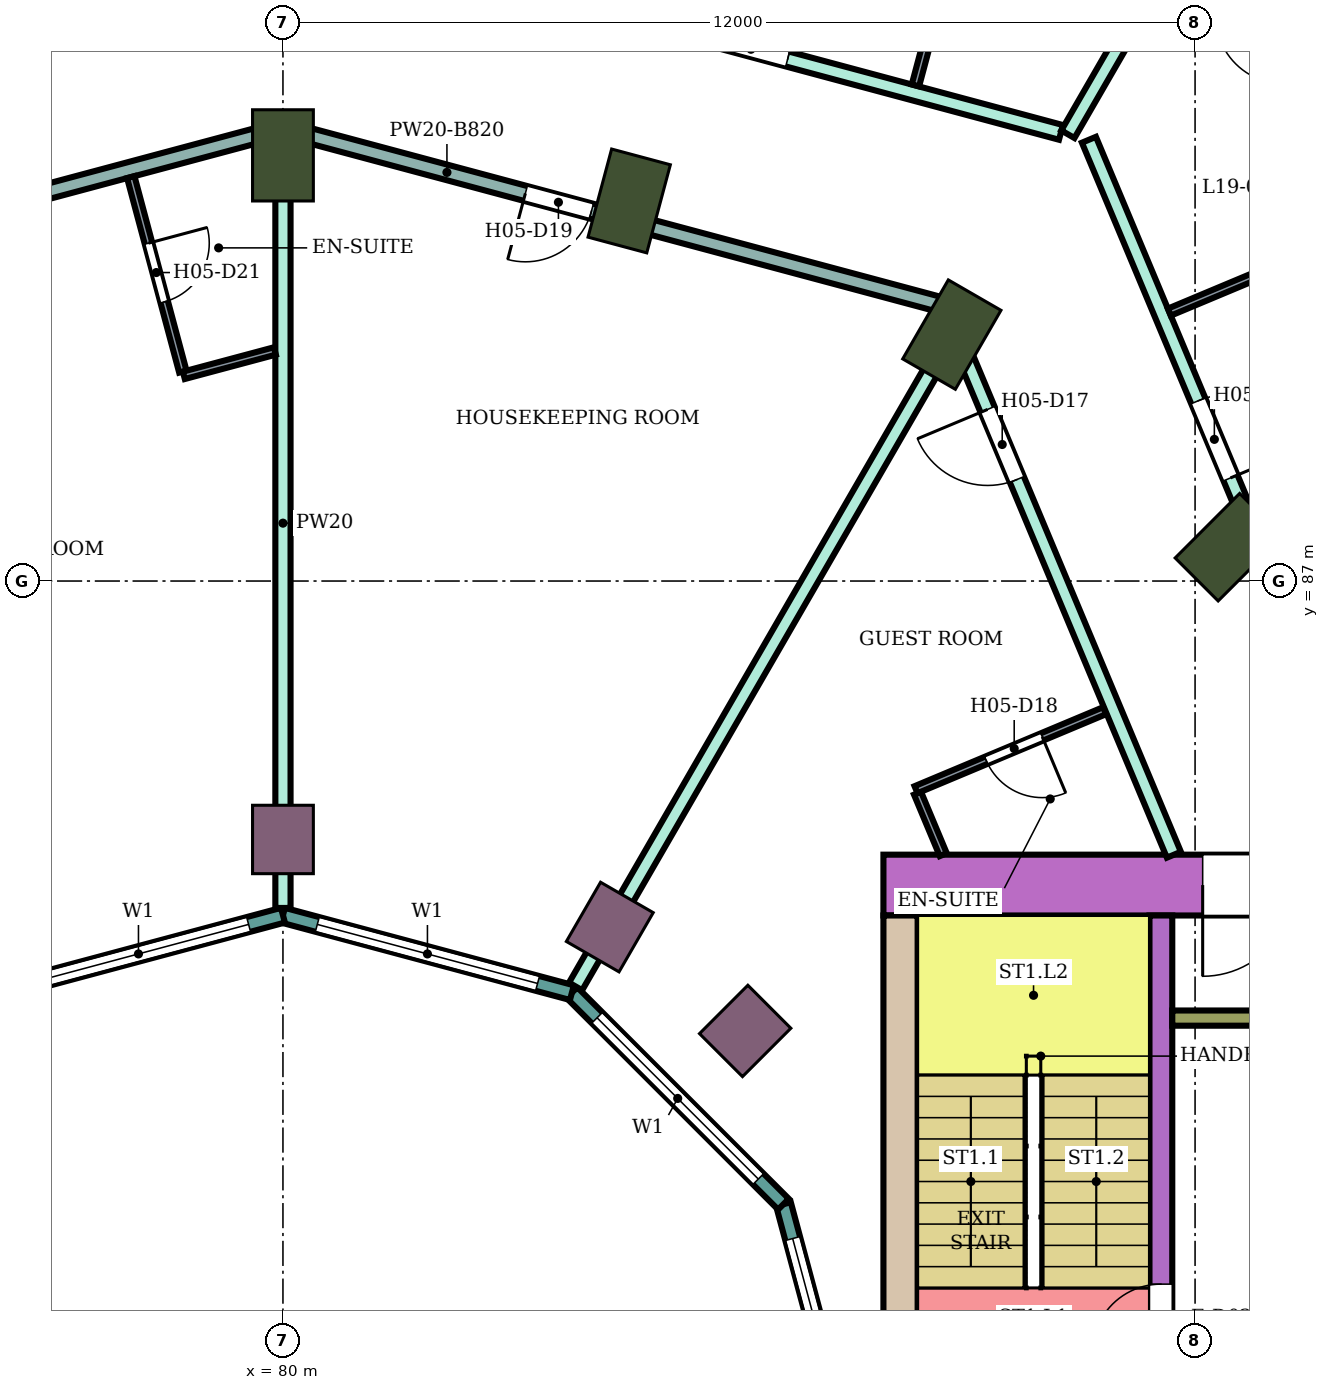
"""IFC4 building model, lengths in metres.
Left out: names, types, materials, properties, quantities, classifications, styles, units other than length and angle.
Written with IfcOpenShell. Run it as: python <this file> out.ifc"""

import sys

from ifc_helpers import new_model, si_unit, direction, frame, frame_2d, origin, origin_2d, place, context, subcontext, project, spatial, rectangle, extrude, element, fill, save


model = new_model("IFC4")
c1 = context("Model", 3, precision=1e-05, world=origin(), true_north=direction((0.0, 1.0)))
c2 = subcontext(c1, "Body", "Model", "MODEL_VIEW")
j1 = project(units=[si_unit("LENGTHUNIT", "METRE"), si_unit("PLANEANGLEUNIT", "RADIAN")], contexts=[c1])
p1 = place(None, origin())
s1 = spatial("IfcSite", under=j1, at=p1, CompositionType="ELEMENT")
p2 = place(p1, origin())
s2 = spatial("IfcBuilding", under=s1, at=p2, CompositionType="ELEMENT")
p3 = place(p2, frame((0.0, 0.0, 86.2)))
s3 = spatial("IfcBuildingStorey", under=s2, at=p3, CompositionType="ELEMENT", Elevation=86.2)
for number, where, z_axis, x_axis in (
    (1, (92.445, 87.445, 0.0), (0.0, 0.0, 1.0), (0.707, 0.707, 0.0)),
    (2, (88.8, 90.242, 0.0), (0.0, 0.0, 1.0), (0.5, 0.866, 0.0)),
    (3, (84.555, 92.0, 0.0), (0.0, 0.0, 1.0), (0.259, 0.966, 0.0)),
    (4, (80.0, 92.6, 0.0), (0.0, 0.0, 1.0), (0.0, 1.0, 0.0)),
):
    element("IfcColumn", number, at=place(p3, frame(where, z_axis=z_axis, x_axis=x_axis)), inside=s3, PredefinedType="COLUMN", context=c2, shape_type="SweptSolid", body=[
        extrude(rectangle(XDim=1.2, YDim=0.8, at=origin_2d()), origin(), (0.0, 0.0, 1.0), 3.8),
    ])
for number, where, z_axis, x_axis in (
    (5, (86.081, 81.081, 0.0), (0.0, 0.0, 1.0), (0.707, 0.707, 0.0)),
    (6, (84.3, 82.448, 0.0), (0.0, 0.0, 1.0), (0.5, 0.866, 0.0)),
    (7, (80.0, 83.6, 0.0), (0.0, 0.0, 1.0), (0.0, 1.0, 0.0)),
):
    element("IfcColumn", number, at=place(p3, frame(where, z_axis=z_axis, x_axis=x_axis)), inside=s3, PredefinedType="COLUMN", context=c2, shape_type="SweptSolid", body=[
        extrude(rectangle(XDim=0.9, YDim=0.8, at=origin_2d()), origin(), (0.0, 0.0, 1.0), 3.8),
    ])
p4 = place(p3, frame((87.9, 83.0, 0.0), z_axis=(0.0, 0.0, 1.0), x_axis=(1.0, 0.0, 0.0)))
e8 = element("IfcWall", 8, at=p4, inside=s3, PredefinedType="SHEAR", context=c2, shape_type="SweptSolid", body=[
    extrude(rectangle(XDim=14.7, YDim=0.8, at=frame_2d((7.35, 0.0))), origin(), (0.0, 0.0, 1.0), 3.48),
])
p5 = place(p4, frame((4.2, 0.0, 0.0)))
e9 = element("IfcOpeningElement", 9, at=p5, cuts=e8, PredefinedType="OPENING", context=c2, shape_type="SweptSolid", body=[
    extrude(rectangle(XDim=2.4, YDim=2.4, at=frame_2d((1.2, 1.2))), frame((0.0, 0.41, 0.0), z_axis=(0.0, -1.0, 0.0), x_axis=(1.0, 0.0, 0.0)), (0.0, 0.0, 1.0), 0.82),
])
p6 = place(p3, frame((88.125, 75.0, 0.0), z_axis=(0.0, 0.0, 1.0), x_axis=(0.0, 1.0, 0.0)))
e10 = element("IfcWall", 10, at=p6, inside=s3, PredefinedType="SHEAR", context=c2, shape_type="SweptSolid", body=[
    extrude(rectangle(XDim=7.6, YDim=0.45, at=frame_2d((3.8, 0.0))), origin(), (0.0, 0.0, 1.0), 3.48),
])
p7 = place(p3, frame((91.55, 75.0, 0.0), z_axis=(0.0, 0.0, 1.0), x_axis=(0.0, 1.0, 0.0)))
e11 = element("IfcWall", 11, at=p7, inside=s3, PredefinedType="SHEAR", context=c2, shape_type="SweptSolid", body=[
    extrude(rectangle(XDim=7.6, YDim=0.3, at=frame_2d((3.8, 0.0))), origin(), (0.0, 0.0, 1.0), 3.48),
])
p8 = place(p7, frame((1.85, 0.0, 0.0)))
e12 = element("IfcOpeningElement", 12, at=p8, cuts=e11, PredefinedType="OPENING", context=c2, shape_type="SweptSolid", body=[
    extrude(rectangle(XDim=0.9, YDim=2.1, at=frame_2d((0.45, 1.05))), frame((0.0, 0.16, 0.0), z_axis=(0.0, -1.0, 0.0), x_axis=(1.0, 0.0, 0.0)), (0.0, 0.0, 1.0), 0.32),
])
p9 = place(p3, frame((91.7, 81.25, 0.0), z_axis=(0.0, 0.0, 1.0), x_axis=(1.0, 0.0, 0.0)))
e13 = element("IfcWall", 13, at=p9, inside=s3, PredefinedType="SHEAR", context=c2, shape_type="SweptSolid", body=[
    extrude(rectangle(XDim=4.65, YDim=0.2, at=frame_2d((2.325, 0.0))), origin(), (0.0, 0.0, 1.0), 3.48),
])
p10 = place(p3, frame((87.604, 75.0, 0.0), z_axis=(0.0, 0.0, 1.0), x_axis=(-0.258789828301, 0.965933654434, 0.0)))
e14 = element("IfcWall", 14, at=p10, inside=s3, PredefinedType="NOTDEFINED", context=c2, shape_type="SweptSolid", body=[
    extrude(rectangle(XDim=3.936, YDim=0.2, at=frame_2d((1.968, 0.0))), origin(), (0.0, 0.0, 1.0), 3.8),
])
p11 = place(p10, frame((0.468, 0.0, 0.9)))
e15 = element("IfcOpeningElement", 15, at=p11, cuts=e14, PredefinedType="OPENING", context=c2, shape_type="SweptSolid", body=[
    extrude(rectangle(XDim=3.0, YDim=2.3, at=frame_2d((1.5, 1.15))), frame((0.0, 0.11, 0.0), z_axis=(0.0, -1.0, 0.0), x_axis=(1.0, 0.0, 0.0)), (0.0, 0.0, 1.0), 0.22),
])
p12 = place(p3, frame((86.585, 78.802, 0.0), z_axis=(0.0, 0.0, 1.0), x_axis=(-0.707106781187, 0.707106781187, 0.0)))
e16 = element("IfcWall", 16, at=p12, inside=s3, PredefinedType="NOTDEFINED", context=c2, shape_type="SweptSolid", body=[
    extrude(rectangle(XDim=3.936, YDim=0.2, at=frame_2d((1.968, 0.0))), origin(), (0.0, 0.0, 1.0), 3.8),
])
p13 = place(p12, frame((0.468, 0.0, 0.9)))
e17 = element("IfcOpeningElement", 17, at=p13, cuts=e16, PredefinedType="OPENING", context=c2, shape_type="SweptSolid", body=[
    extrude(rectangle(XDim=3.0, YDim=2.3, at=frame_2d((1.5, 1.15))), frame((0.0, 0.11, 0.0), z_axis=(0.0, -1.0, 0.0), x_axis=(1.0, 0.0, 0.0)), (0.0, 0.0, 1.0), 0.22),
])
p14 = place(p3, frame((83.802, 81.585, 0.0), z_axis=(0.0, 0.0, 1.0), x_axis=(-0.965933654434, 0.258789828301, 0.0)))
e18 = element("IfcWall", 18, at=p14, inside=s3, PredefinedType="NOTDEFINED", context=c2, shape_type="SweptSolid", body=[
    extrude(rectangle(XDim=3.936, YDim=0.2, at=frame_2d((1.968, 0.0))), origin(), (0.0, 0.0, 1.0), 3.8),
])
p15 = place(p14, frame((0.468, 0.0, 0.9)))
e19 = element("IfcOpeningElement", 19, at=p15, cuts=e18, PredefinedType="OPENING", context=c2, shape_type="SweptSolid", body=[
    extrude(rectangle(XDim=3.0, YDim=2.3, at=frame_2d((1.5, 1.15))), frame((0.0, 0.11, 0.0), z_axis=(0.0, -1.0, 0.0), x_axis=(1.0, 0.0, 0.0)), (0.0, 0.0, 1.0), 0.22),
])
p16 = place(p3, frame((80.0, 82.604, 0.0), z_axis=(0.0, 0.0, 1.0), x_axis=(-0.965933654434, -0.258789828301, 0.0)))
e20 = element("IfcWall", 20, at=p16, inside=s3, PredefinedType="NOTDEFINED", context=c2, shape_type="SweptSolid", body=[
    extrude(rectangle(XDim=3.936, YDim=0.2, at=frame_2d((1.968, 0.0))), origin(), (0.0, 0.0, 1.0), 3.8),
])
p17 = place(p16, frame((0.468, 0.0, 0.9)))
e21 = element("IfcOpeningElement", 21, at=p17, cuts=e20, PredefinedType="OPENING", context=c2, shape_type="SweptSolid", body=[
    extrude(rectangle(XDim=3.0, YDim=2.3, at=frame_2d((1.5, 1.15))), frame((0.0, 0.11, 0.0), z_axis=(0.0, -1.0, 0.0), x_axis=(1.0, 0.0, 0.0)), (0.0, 0.0, 1.0), 0.22),
])
p18 = place(p3, frame((69.397, 92.805, 0.0), z_axis=(0.0, 0.0, 1.0), x_axis=(0.96596468683, 0.258673972015, 0.0)))
e22 = element("IfcWall", 22, at=p18, inside=s3, PredefinedType="PARTITIONING", context=c2, shape_type="SweptSolid", body=[
    extrude(rectangle(XDim=10.937, YDim=0.2, at=frame_2d((5.469, 0.0))), origin(), (0.0, 0.0, 1.0), 3.35),
])
p19 = place(p18, frame((6.163, 0.0, 0.0)))
e23 = element("IfcOpeningElement", 23, at=p19, cuts=e22, PredefinedType="OPENING", context=c2, shape_type="SweptSolid", body=[
    extrude(rectangle(XDim=1.0, YDim=2.1, at=frame_2d((0.5, 1.05))), frame((0.0, 0.11, 0.0), z_axis=(0.0, -1.0, 0.0), x_axis=(1.0, 0.0, 0.0)), (0.0, 0.0, 1.0), 0.22),
])
p20 = place(p18, frame((4.103, 0.0, 0.0)))
e24 = element("IfcOpeningElement", 24, at=p20, cuts=e22, PredefinedType="OPENING", context=c2, shape_type="SweptSolid", body=[
    extrude(rectangle(XDim=1.0, YDim=2.1, at=frame_2d((0.5, 1.05))), frame((0.0, 0.11, 0.0), z_axis=(0.0, -1.0, 0.0), x_axis=(1.0, 0.0, 0.0)), (0.0, 0.0, 1.0), 0.22),
])
p21 = place(p3, frame((71.303, 90.625, 0.0), z_axis=(0.0, 0.0, 1.0), x_axis=(0.965971868307, 0.258647152776, 0.0)))
e25 = element("IfcWall", 25, at=p21, inside=s3, PredefinedType="PARTITIONING", context=c2, shape_type="SweptSolid", body=[
    extrude(rectangle(XDim=8.874, YDim=0.2, at=frame_2d((4.437, 0.0))), origin(), (0.0, 0.0, 1.0), 2.98),
])
p22 = place(p21, frame((0.55, 0.0, 0.0)))
e26 = element("IfcOpeningElement", 26, at=p22, cuts=e25, PredefinedType="OPENING", context=c2, shape_type="SweptSolid", body=[
    extrude(rectangle(XDim=1.0, YDim=2.1, at=frame_2d((0.5, 1.05))), frame((0.0, 0.11, 0.0), z_axis=(0.0, -1.0, 0.0), x_axis=(1.0, 0.0, 0.0)), (0.0, 0.0, 1.0), 0.22),
])
p23 = place(p3, frame((80.0, 82.699, 0.0), z_axis=(0.0, 0.0, 1.0), x_axis=(0.0, 1.0, 0.0)))
e27 = element("IfcWall", 27, at=p23, inside=s3, PredefinedType="PARTITIONING", context=c2, shape_type="SweptSolid", body=[
    extrude(rectangle(XDim=10.125, YDim=0.2, at=frame_2d((5.062, 0.0))), origin(), (0.0, 0.0, 1.0), 3.35),
])
p24 = place(p3, frame((80.0, 92.954, 0.0), z_axis=(0.0, 0.0, 1.0), x_axis=(0.965932194462, -0.258795277586, 0.0)))
e28 = element("IfcWall", 28, at=p24, inside=s3, PredefinedType="PARTITIONING", context=c2, shape_type="SweptSolid", body=[
    extrude(rectangle(XDim=8.934, YDim=0.2, at=frame_2d((4.467, 0.0))), origin(), (0.0, 0.0, 1.0), 2.98),
])
p25 = place(p24, frame((3.302, 0.0, 0.0)))
e29 = element("IfcOpeningElement", 29, at=p25, cuts=e28, PredefinedType="OPENING", context=c2, shape_type="SweptSolid", body=[
    extrude(rectangle(XDim=0.9, YDim=2.1, at=frame_2d((0.45, 1.05))), frame((0.0, 0.11, 0.0), z_axis=(0.0, -1.0, 0.0), x_axis=(1.0, 0.0, 0.0)), (0.0, 0.0, 1.0), 0.22),
])
p26 = place(p3, frame((80.0, 95.648, 0.0), z_axis=(0.0, 0.0, 1.0), x_axis=(0.965852259202, -0.259093445292, 0.0)))
e30 = element("IfcWall", 30, at=p26, inside=s3, PredefinedType="PARTITIONING", context=c2, shape_type="SweptSolid", body=[
    extrude(rectangle(XDim=10.597, YDim=0.2, at=frame_2d((5.298, 0.0))), origin(), (0.0, 0.0, 1.0), 3.35),
])
p27 = place(p26, frame((5.875, 0.0, 0.0)))
e31 = element("IfcOpeningElement", 31, at=p27, cuts=e30, PredefinedType="OPENING", context=c2, shape_type="SweptSolid", body=[
    extrude(rectangle(XDim=1.0, YDim=2.1, at=frame_2d((0.5, 1.05))), frame((0.0, 0.11, 0.0), z_axis=(0.0, -1.0, 0.0), x_axis=(1.0, 0.0, 0.0)), (0.0, 0.0, 1.0), 0.22),
])
p28 = place(p3, frame((83.85, 81.667, 0.0), z_axis=(0.0, 0.0, 1.0), x_axis=(0.500222212082, 0.865897071562, 0.0)))
e32 = element("IfcWall", 32, at=p28, inside=s3, PredefinedType="PARTITIONING", context=c2, shape_type="SweptSolid", body=[
    extrude(rectangle(XDim=9.768, YDim=0.2, at=frame_2d((4.884, 0.0))), origin(), (0.0, 0.0, 1.0), 3.35),
])
p29 = place(p3, frame((88.698, 90.624, 0.0), z_axis=(0.0, 0.0, 1.0), x_axis=(0.386027055918, -0.922487459047, 0.0)))
e33 = element("IfcWall", 33, at=p29, inside=s3, PredefinedType="PARTITIONING", context=c2, shape_type="SweptSolid", body=[
    extrude(rectangle(XDim=7.832, YDim=0.2, at=frame_2d((3.916, 0.0))), origin(), (0.0, 0.0, 1.0), 3.35),
])
p30 = place(p29, frame((1.482, 0.0, 0.0)))
e34 = element("IfcOpeningElement", 34, at=p30, cuts=e33, PredefinedType="OPENING", context=c2, shape_type="SweptSolid", body=[
    extrude(rectangle(XDim=1.0, YDim=2.1, at=frame_2d((0.5, 1.05))), frame((0.0, 0.11, 0.0), z_axis=(0.0, -1.0, 0.0), x_axis=(1.0, 0.0, 0.0)), (0.0, 0.0, 1.0), 0.22),
])
p31 = place(p3, frame((90.327, 92.878, 0.0), z_axis=(0.0, 0.0, 1.0), x_axis=(0.50022153717, 0.865897461453, 0.0)))
e35 = element("IfcWall", 35, at=p31, inside=s3, PredefinedType="PARTITIONING", context=c2, shape_type="SweptSolid", body=[
    extrude(rectangle(XDim=5.152, YDim=0.2, at=frame_2d((2.576, 0.0))), origin(), (0.0, 0.0, 1.0), 3.35),
])
p32 = place(p3, frame((90.604, 92.805, 0.0), z_axis=(0.0, 0.0, 1.0), x_axis=(0.386209298583, -0.922411176042, 0.0)))
e36 = element("IfcWall", 36, at=p32, inside=s3, PredefinedType="PARTITIONING", context=c2, shape_type="SweptSolid", body=[
    extrude(rectangle(XDim=8.48, YDim=0.2, at=frame_2d((4.24, 0.0))), origin(), (0.0, 0.0, 1.0), 3.35),
])
p33 = place(p32, frame((3.723, 0.0, 0.0)))
e37 = element("IfcOpeningElement", 37, at=p33, cuts=e36, PredefinedType="OPENING", context=c2, shape_type="SweptSolid", body=[
    extrude(rectangle(XDim=1.1, YDim=2.1, at=frame_2d((0.55, 1.05))), frame((0.0, 0.11, 0.0), z_axis=(0.0, -1.0, 0.0), x_axis=(1.0, 0.0, 0.0)), (0.0, 0.0, 1.0), 0.22),
])
p34 = place(p3, frame((77.998, 92.314, 0.0), z_axis=(0.0, 0.0, 1.0), x_axis=(0.258608674509, -0.965982170368, 0.0)))
e38 = element("IfcWall", 38, at=p34, inside=s3, PredefinedType="PARTITIONING", context=c2, shape_type="SweptSolid", body=[
    extrude(rectangle(XDim=2.65, YDim=0.1, at=frame_2d((1.325, 0.0))), origin(), (0.0, 0.0, 1.0), 3.35),
])
p35 = place(p34, frame((0.9, 0.0, 0.0)))
e39 = element("IfcOpeningElement", 39, at=p35, cuts=e38, PredefinedType="OPENING", context=c2, shape_type="SweptSolid", body=[
    extrude(rectangle(XDim=0.8, YDim=2.1, at=frame_2d((0.4, 1.05))), frame((0.0, 0.06, 0.0), z_axis=(0.0, -1.0, 0.0), x_axis=(1.0, 0.0, 0.0)), (0.0, 0.0, 1.0), 0.12),
])
p36 = place(p3, frame((78.696, 89.706, 0.0), z_axis=(0.0, 0.0, 1.0), x_axis=(0.966002513606, 0.258532674351, 0.0)))
e40 = element("IfcWall", 40, at=p36, inside=s3, PredefinedType="PARTITIONING", context=c2, shape_type="SweptSolid", body=[
    extrude(rectangle(XDim=1.24, YDim=0.1, at=frame_2d((0.62, 0.0))), origin(), (0.0, 0.0, 1.0), 3.35),
])
p37 = place(p3, frame((88.321, 93.521, 0.0), z_axis=(0.0, 0.0, 1.0), x_axis=(0.258677737588, 0.965963678446, 0.0)))
e41 = element("IfcWall", 41, at=p37, inside=s3, PredefinedType="PARTITIONING", context=c2, shape_type="SweptSolid", body=[
    extrude(rectangle(XDim=2.649, YDim=0.1, at=frame_2d((1.325, 0.0))), origin(), (0.0, 0.0, 1.0), 3.35),
])
p38 = place(p3, frame((88.348, 84.209, 0.0), z_axis=(0.0, 0.0, 1.0), x_axis=(0.386077497504, -0.922466349479, 0.0)))
e42 = element("IfcWall", 42, at=p38, inside=s3, PredefinedType="PARTITIONING", context=c2, shape_type="SweptSolid", body=[
    extrude(rectangle(XDim=0.877, YDim=0.1, at=frame_2d((0.438, 0.0))), origin(), (0.0, 0.0, 1.0), 3.35),
])
p39 = place(p3, frame((88.329, 84.255, 0.0), z_axis=(0.0, 0.0, 1.0), x_axis=(0.922320663728, 0.386425404522, 0.0)))
e43 = element("IfcWall", 43, at=p39, inside=s3, PredefinedType="PARTITIONING", context=c2, shape_type="SweptSolid", body=[
    extrude(rectangle(XDim=2.69, YDim=0.1, at=frame_2d((1.345, 0.0))), origin(), (0.0, 0.0, 1.0), 3.35),
])
p40 = place(p39, frame((1.0, 0.0, 0.0)))
e44 = element("IfcOpeningElement", 44, at=p40, cuts=e43, PredefinedType="OPENING", context=c2, shape_type="SweptSolid", body=[
    extrude(rectangle(XDim=0.8, YDim=2.1, at=frame_2d((0.4, 1.05))), frame((0.0, 0.06, 0.0), z_axis=(0.0, -1.0, 0.0), x_axis=(1.0, 0.0, 0.0)), (0.0, 0.0, 1.0), 0.12),
])
p41 = place(p3, frame((91.661, 90.538, 0.0), z_axis=(0.0, 0.0, 1.0), x_axis=(0.922352973625, 0.386348278169, 0.0)))
e45 = element("IfcWall", 45, at=p41, inside=s3, PredefinedType="PARTITIONING", context=c2, shape_type="SweptSolid", body=[
    extrude(rectangle(XDim=2.85, YDim=0.1, at=frame_2d((1.425, 0.0))), origin(), (0.0, 0.0, 1.0), 3.35),
])
p42 = place(p3, frame((92.414, 96.246, 0.0), z_axis=(0.0, 0.0, 1.0), x_axis=(0.386353683992, -0.922350709256, 0.0)))
e46 = element("IfcWall", 46, at=p42, inside=s3, PredefinedType="PARTITIONING", context=c2, shape_type="SweptSolid", body=[
    extrude(rectangle(XDim=4.974, YDim=0.1, at=frame_2d((2.487, 0.0))), origin(), (0.0, 0.0, 1.0), 2.58),
])
p43 = place(p42, frame((1.957, 0.0, 0.0)))
e47 = element("IfcOpeningElement", 47, at=p43, cuts=e46, PredefinedType="OPENING", context=c2, shape_type="SweptSolid", body=[
    extrude(rectangle(XDim=0.9, YDim=2.1, at=frame_2d((0.45, 1.05))), frame((0.0, 0.06, 0.0), z_axis=(0.0, -1.0, 0.0), x_axis=(1.0, 0.0, 0.0)), (0.0, 0.0, 1.0), 0.12),
])
p44 = place(p11, origin())
e48 = element("IfcWindow", 48, at=p44, inside=s3, PartitioningType="SINGLE_PANEL", PredefinedType="WINDOW", context=c2, shape_type="SweptSolid", body=[
    extrude(rectangle(XDim=3.0, YDim=2.3, at=frame_2d((1.5, 1.15))), frame((0.0, 0.03, 0.0), z_axis=(0.0, -1.0, 0.0), x_axis=(1.0, 0.0, 0.0)), (0.0, 0.0, 1.0), 0.06),
])
fill(e15, e48)
p45 = place(p13, origin())
e49 = element("IfcWindow", 49, at=p45, inside=s3, PartitioningType="SINGLE_PANEL", PredefinedType="WINDOW", context=c2, shape_type="SweptSolid", body=[
    extrude(rectangle(XDim=3.0, YDim=2.3, at=frame_2d((1.5, 1.15))), frame((0.0, 0.03, 0.0), z_axis=(0.0, -1.0, 0.0), x_axis=(1.0, 0.0, 0.0)), (0.0, 0.0, 1.0), 0.06),
])
fill(e17, e49)
p46 = place(p15, origin())
e50 = element("IfcWindow", 50, at=p46, inside=s3, PartitioningType="SINGLE_PANEL", PredefinedType="WINDOW", context=c2, shape_type="SweptSolid", body=[
    extrude(rectangle(XDim=3.0, YDim=2.3, at=frame_2d((1.5, 1.15))), frame((0.0, 0.03, 0.0), z_axis=(0.0, -1.0, 0.0), x_axis=(1.0, 0.0, 0.0)), (0.0, 0.0, 1.0), 0.06),
])
fill(e19, e50)
p47 = place(p17, origin())
e51 = element("IfcWindow", 51, at=p47, inside=s3, PartitioningType="SINGLE_PANEL", PredefinedType="WINDOW", context=c2, shape_type="SweptSolid", body=[
    extrude(rectangle(XDim=3.0, YDim=2.3, at=frame_2d((1.5, 1.15))), frame((0.0, 0.03, 0.0), z_axis=(0.0, -1.0, 0.0), x_axis=(1.0, 0.0, 0.0)), (0.0, 0.0, 1.0), 0.06),
])
fill(e21, e51)
p48 = place(p33, origin())
e52 = element("IfcDoor", 52, at=p48, inside=s3, OperationType="SINGLE_SWING_RIGHT", PredefinedType="DOOR", context=c2, shape_type="SweptSolid", body=[
    extrude(rectangle(XDim=1.1, YDim=2.1, at=frame_2d((0.55, 1.05))), frame((0.0, 0.025, 0.0), z_axis=(0.0, -1.0, 0.0), x_axis=(1.0, 0.0, 0.0)), (0.0, 0.0, 1.0), 0.05),
])
fill(e37, e52)
p49 = place(p27, origin())
e53 = element("IfcDoor", 53, at=p49, inside=s3, OperationType="SINGLE_SWING_LEFT", PredefinedType="DOOR", context=c2, shape_type="SweptSolid", body=[
    extrude(rectangle(XDim=1.0, YDim=2.1, at=frame_2d((0.5, 1.05))), frame((0.0, 0.025, 0.0), z_axis=(0.0, -1.0, 0.0), x_axis=(1.0, 0.0, 0.0)), (0.0, 0.0, 1.0), 0.05),
])
fill(e31, e53)
p50 = place(p30, frame((1.0, 0.0, 0.0), z_axis=(0.0, 0.0, 1.0), x_axis=(-1.0, 0.0, 0.0)))
e54 = element("IfcDoor", 54, at=p50, inside=s3, OperationType="SINGLE_SWING_RIGHT", PredefinedType="DOOR", context=c2, shape_type="SweptSolid", body=[
    extrude(rectangle(XDim=1.0, YDim=2.1, at=frame_2d((0.5, 1.05))), frame((0.0, 0.025, 0.0), z_axis=(0.0, -1.0, 0.0), x_axis=(1.0, 0.0, 0.0)), (0.0, 0.0, 1.0), 0.05),
])
fill(e34, e54)
p51 = place(p40, frame((0.8, 0.0, 0.0), z_axis=(0.0, 0.0, 1.0), x_axis=(-1.0, 0.0, 0.0)))
e55 = element("IfcDoor", 55, at=p51, inside=s3, OperationType="SINGLE_SWING_LEFT", PredefinedType="DOOR", context=c2, shape_type="SweptSolid", body=[
    extrude(rectangle(XDim=0.8, YDim=2.1, at=frame_2d((0.4, 1.05))), frame((0.0, 0.025, 0.0), z_axis=(0.0, -1.0, 0.0), x_axis=(1.0, 0.0, 0.0)), (0.0, 0.0, 1.0), 0.05),
])
fill(e44, e55)
p52 = place(p25, frame((0.9, 0.0, 0.0), z_axis=(0.0, 0.0, 1.0), x_axis=(-1.0, 0.0, 0.0)))
e56 = element("IfcDoor", 56, at=p52, inside=s3, OperationType="SINGLE_SWING_RIGHT", PredefinedType="DOOR", context=c2, shape_type="SweptSolid", body=[
    extrude(rectangle(XDim=0.9, YDim=2.1, at=frame_2d((0.45, 1.05))), frame((0.0, 0.025, 0.0), z_axis=(0.0, -1.0, 0.0), x_axis=(1.0, 0.0, 0.0)), (0.0, 0.0, 1.0), 0.05),
])
fill(e29, e56)
p53 = place(p35, origin())
e57 = element("IfcDoor", 57, at=p53, inside=s3, OperationType="SINGLE_SWING_LEFT", PredefinedType="DOOR", context=c2, shape_type="SweptSolid", body=[
    extrude(rectangle(XDim=0.8, YDim=2.1, at=frame_2d((0.4, 1.05))), frame((0.0, 0.025, 0.0), z_axis=(0.0, -1.0, 0.0), x_axis=(1.0, 0.0, 0.0)), (0.0, 0.0, 1.0), 0.05),
])
fill(e39, e57)
p54 = place(p8, origin())
e58 = element("IfcDoor", 58, at=p54, inside=s3, OperationType="SINGLE_SWING_LEFT", PredefinedType="DOOR", context=c2, shape_type="SweptSolid", body=[
    extrude(rectangle(XDim=0.9, YDim=2.1, at=frame_2d((0.45, 1.05))), frame((0.0, 0.025, 0.0), z_axis=(0.0, -1.0, 0.0), x_axis=(1.0, 0.0, 0.0)), (0.0, 0.0, 1.0), 0.05),
])
fill(e12, e58)
p55 = place(p5, frame((2.4, 0.0, 0.0), z_axis=(0.0, 0.0, 1.0), x_axis=(-1.0, 0.0, 0.0)))
e59 = element("IfcDoor", 59, at=p55, inside=s3, OperationType="DOUBLE_DOOR_SINGLE_SWING", PredefinedType="DOOR", context=c2, shape_type="SweptSolid", body=[
    extrude(rectangle(XDim=2.4, YDim=2.4, at=frame_2d((1.2, 1.2))), frame((0.0, 0.025, 0.0), z_axis=(0.0, -1.0, 0.0), x_axis=(1.0, 0.0, 0.0)), (0.0, 0.0, 1.0), 0.05),
])
fill(e9, e59)
save(model, sys.argv[1])
